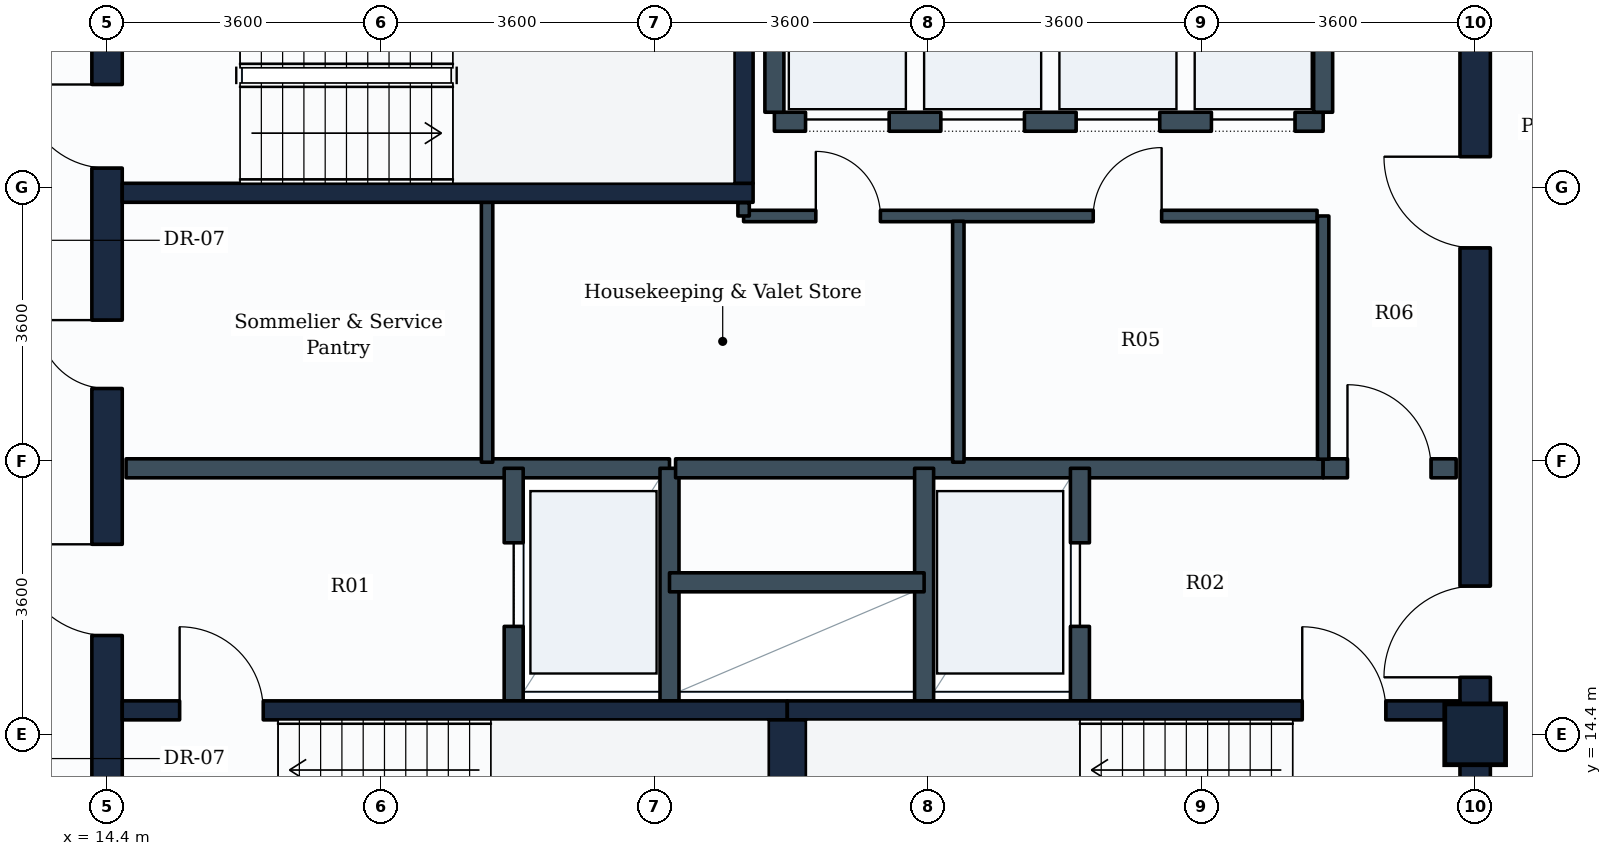
"""IFC4 building model, lengths in metres.
Left out: names, types, materials, properties, quantities, classifications, styles, units other than length and angle.
Written with IfcOpenShell. Run it as: python <this file> out.ifc"""

import sys

from ifc_helpers import new_model, si_unit, direction, frame, frame_2d, origin, origin_2d, place, context, subcontext, project, spatial, rectangle, extrude, element, fill, save


model = new_model("IFC4")
c1 = context("Model", 3, precision=1e-05, world=origin(), true_north=direction((0.0, 1.0)))
c2 = subcontext(c1, "Body", "Model", "MODEL_VIEW")
j1 = project(units=[si_unit("LENGTHUNIT", "METRE"), si_unit("PLANEANGLEUNIT", "RADIAN")], contexts=[c1])
p1 = place(None, origin())
s1 = spatial("IfcSite", under=j1, at=p1, CompositionType="ELEMENT")
p2 = place(p1, origin())
s2 = spatial("IfcBuilding", under=s1, at=p2, CompositionType="ELEMENT")
p3 = place(p2, frame((0.0, 0.0, 273.8)))
s3 = spatial("IfcBuildingStorey", under=s2, at=p3, CompositionType="ELEMENT", Elevation=273.8)
p4 = place(p3, frame((32.4, 14.4, 0.0), z_axis=(0.0, 0.0, 1.0), x_axis=(1.0, 0.0, 0.0)))
e1 = element("IfcColumn", 1, at=p4, inside=s3, PredefinedType="COLUMN", context=c2, shape_type="SweptSolid", body=[
    extrude(rectangle(XDim=0.8, YDim=0.8, at=origin_2d()), origin(), (0.0, 0.0, 1.0), 3.6),
])
p5 = place(p3, frame((14.4, 10.8, 0.0), z_axis=(0.0, 0.0, 1.0), x_axis=(0.0, 1.0, 0.0)))
e2 = element("IfcWall", 2, at=p5, inside=s3, PredefinedType="SHEAR", context=c2, shape_type="SweptSolid", body=[
    extrude(rectangle(XDim=14.4, YDim=0.4, at=frame_2d((7.2, 0.0))), origin(), (0.0, 0.0, 1.0), 3.35),
])
p6 = place(p5, frame((11.05, 0.0, 0.0)))
e3 = element("IfcOpeningElement", 3, at=p6, cuts=e2, PredefinedType="OPENING", context=c2, shape_type="SweptSolid", body=[
    extrude(rectangle(XDim=1.1, YDim=2.1, at=frame_2d((0.55, 1.05))), frame((0.0, 0.21, 0.0), z_axis=(0.0, -1.0, 0.0), x_axis=(1.0, 0.0, 0.0)), (0.0, 0.0, 1.0), 0.42),
])
p7 = place(p5, frame((4.9, 0.0, 0.0)))
e4 = element("IfcOpeningElement", 4, at=p7, cuts=e2, PredefinedType="OPENING", context=c2, shape_type="SweptSolid", body=[
    extrude(rectangle(XDim=1.2, YDim=2.1, at=frame_2d((0.6, 1.05))), frame((0.0, 0.21, 0.0), z_axis=(0.0, -1.0, 0.0), x_axis=(1.0, 0.0, 0.0)), (0.0, 0.0, 1.0), 0.42),
])
p8 = place(p5, frame((8.15, 0.0, 0.0)))
e5 = element("IfcOpeningElement", 5, at=p8, cuts=e2, PredefinedType="OPENING", context=c2, shape_type="SweptSolid", body=[
    extrude(rectangle(XDim=0.9, YDim=2.1, at=frame_2d((0.45, 1.05))), frame((0.0, 0.21, 0.0), z_axis=(0.0, -1.0, 0.0), x_axis=(1.0, 0.0, 0.0)), (0.0, 0.0, 1.0), 0.42),
])
p9 = place(p3, frame((32.4, 10.8, 0.0), z_axis=(0.0, 0.0, 1.0), x_axis=(0.0, 1.0, 0.0)))
e6 = element("IfcWall", 6, at=p9, inside=s3, PredefinedType="SHEAR", context=c2, shape_type="SweptSolid", body=[
    extrude(rectangle(XDim=14.4, YDim=0.4, at=frame_2d((7.2, 0.0))), origin(), (0.0, 0.0, 1.0), 3.35),
])
p10 = place(p9, frame((4.35, 0.0, 0.0)))
e7 = element("IfcOpeningElement", 7, at=p10, cuts=e6, PredefinedType="OPENING", context=c2, shape_type="SweptSolid", body=[
    extrude(rectangle(XDim=1.2, YDim=2.1, at=frame_2d((0.6, 1.05))), frame((0.0, 0.21, 0.0), z_axis=(0.0, -1.0, 0.0), x_axis=(1.0, 0.0, 0.0)), (0.0, 0.0, 1.0), 0.42),
])
p11 = place(p9, frame((10.0, 0.0, 0.0)))
e8 = element("IfcOpeningElement", 8, at=p11, cuts=e6, PredefinedType="OPENING", context=c2, shape_type="SweptSolid", body=[
    extrude(rectangle(XDim=1.2, YDim=2.1, at=frame_2d((0.6, 1.05))), frame((0.0, 0.21, 0.0), z_axis=(0.0, -1.0, 0.0), x_axis=(1.0, 0.0, 0.0)), (0.0, 0.0, 1.0), 0.42),
])
p12 = place(p3, frame((14.6, 14.715, 0.0), z_axis=(0.0, 0.0, 1.0), x_axis=(1.0, 0.0, 0.0)))
e9 = element("IfcWall", 9, at=p12, inside=s3, PredefinedType="SHEAR", context=c2, shape_type="SweptSolid", body=[
    extrude(rectangle(XDim=8.75, YDim=0.25, at=frame_2d((4.375, 0.0))), origin(), (0.0, 0.0, 1.0), 3.35),
])
p13 = place(p12, frame((0.755, 0.0, 0.0)))
e10 = element("IfcOpeningElement", 10, at=p13, cuts=e9, PredefinedType="OPENING", context=c2, shape_type="SweptSolid", body=[
    extrude(rectangle(XDim=1.1, YDim=2.1, at=frame_2d((0.55, 1.05))), frame((0.0, 0.135, 0.0), z_axis=(0.0, -1.0, 0.0), x_axis=(1.0, 0.0, 0.0)), (0.0, 0.0, 1.0), 0.27),
])
p14 = place(p3, frame((23.35, 14.715, 0.0), z_axis=(0.0, 0.0, 1.0), x_axis=(1.0, 0.0, 0.0)))
e11 = element("IfcWall", 11, at=p14, inside=s3, PredefinedType="SHEAR", context=c2, shape_type="SweptSolid", body=[
    extrude(rectangle(XDim=8.85, YDim=0.25, at=frame_2d((4.425, 0.0))), origin(), (0.0, 0.0, 1.0), 3.35),
])
p15 = place(p14, frame((6.775, 0.0, 0.0)))
e12 = element("IfcOpeningElement", 12, at=p15, cuts=e11, PredefinedType="OPENING", context=c2, shape_type="SweptSolid", body=[
    extrude(rectangle(XDim=1.1, YDim=2.1, at=frame_2d((0.55, 1.05))), frame((0.0, 0.135, 0.0), z_axis=(0.0, -1.0, 0.0), x_axis=(1.0, 0.0, 0.0)), (0.0, 0.0, 1.0), 0.27),
])
p16 = place(p3, frame((23.35, 11.75, 0.0), z_axis=(0.0, 0.0, 1.0), x_axis=(0.0, 1.0, 0.0)))
e13 = element("IfcWall", 13, at=p16, inside=s3, PredefinedType="SHEAR", context=c2, shape_type="SweptSolid", body=[
    extrude(rectangle(XDim=2.84, YDim=0.5, at=frame_2d((1.42, 0.0))), origin(), (0.0, 0.0, 1.0), 3.35),
])
p17 = place(p3, frame((14.6, 21.525, 0.0), z_axis=(0.0, 0.0, 1.0), x_axis=(1.0, 0.0, 0.0)))
e14 = element("IfcWall", 14, at=p17, inside=s3, PredefinedType="SHEAR", context=c2, shape_type="SweptSolid", body=[
    extrude(rectangle(XDim=8.3, YDim=0.25, at=frame_2d((4.15, 0.0))), origin(), (0.0, 0.0, 1.0), 3.35),
])
p18 = place(p3, frame((22.775, 21.65, 0.0), z_axis=(0.0, 0.0, 1.0), x_axis=(0.0, 1.0, 0.0)))
e15 = element("IfcWall", 15, at=p18, inside=s3, PredefinedType="SHEAR", context=c2, shape_type="SweptSolid", body=[
    extrude(rectangle(XDim=2.84, YDim=0.25, at=frame_2d((1.42, 0.0))), origin(), (0.0, 0.0, 1.0), 3.35),
])
p19 = place(p3, frame((14.65, 17.9, 0.0), z_axis=(0.0, 0.0, 1.0), x_axis=(1.0, 0.0, 0.0)))
e16 = element("IfcWall", 16, at=p19, inside=s3, PredefinedType="PARTITIONING", context=c2, shape_type="SweptSolid", body=[
    extrude(rectangle(XDim=7.15, YDim=0.25, at=frame_2d((3.575, 0.0))), origin(), (0.0, 0.0, 1.0), 3.335),
])
p20 = place(p3, frame((19.75, 14.84, 0.0), z_axis=(0.0, 0.0, 1.0), x_axis=(0.0, 1.0, 0.0)))
e17 = element("IfcWall", 17, at=p20, inside=s3, PredefinedType="PARTITIONING", context=c2, shape_type="SweptSolid", body=[
    extrude(rectangle(XDim=3.06, YDim=0.25, at=frame_2d((1.53, 0.0))), origin(), (0.0, 0.0, 1.0), 3.335),
])
p21 = place(p20, frame((0.98, 0.0, 0.0)))
e18 = element("IfcOpeningElement", 18, at=p21, cuts=e17, PredefinedType="OPENING", context=c2, shape_type="SweptSolid", body=[
    extrude(rectangle(XDim=1.1, YDim=2.1, at=frame_2d((0.55, 1.05))), frame((0.0, 0.135, 0.0), z_axis=(0.0, -1.0, 0.0), x_axis=(1.0, 0.0, 0.0)), (0.0, 0.0, 1.0), 0.27),
])
p22 = place(p3, frame((21.8, 14.84, 0.0), z_axis=(0.0, 0.0, 1.0), x_axis=(0.0, 1.0, 0.0)))
e19 = element("IfcWall", 19, at=p22, inside=s3, PredefinedType="PARTITIONING", context=c2, shape_type="SweptSolid", body=[
    extrude(rectangle(XDim=3.06, YDim=0.25, at=frame_2d((1.53, 0.0))), origin(), (0.0, 0.0, 1.0), 3.335),
])
p23 = place(p3, frame((21.88, 17.9, 0.0), z_axis=(0.0, 0.0, 1.0), x_axis=(1.0, 0.0, 0.0)))
e20 = element("IfcWall", 20, at=p23, inside=s3, PredefinedType="PARTITIONING", context=c2, shape_type="SweptSolid", body=[
    extrude(rectangle(XDim=8.52, YDim=0.25, at=frame_2d((4.26, 0.0))), origin(), (0.0, 0.0, 1.0), 3.335),
])
p24 = place(p3, frame((30.4, 17.9, 0.0), z_axis=(0.0, 0.0, 1.0), x_axis=(1.0, 0.0, 0.0)))
e21 = element("IfcWall", 21, at=p24, inside=s3, PredefinedType="PARTITIONING", context=c2, shape_type="SweptSolid", body=[
    extrude(rectangle(XDim=1.75, YDim=0.25, at=frame_2d((0.875, 0.0))), origin(), (0.0, 0.0, 1.0), 3.335),
])
p25 = place(p24, frame((0.32, 0.0, 0.0)))
e22 = element("IfcOpeningElement", 22, at=p25, cuts=e21, PredefinedType="OPENING", context=c2, shape_type="SweptSolid", body=[
    extrude(rectangle(XDim=1.1, YDim=2.1, at=frame_2d((0.55, 1.05))), frame((0.0, 0.135, 0.0), z_axis=(0.0, -1.0, 0.0), x_axis=(1.0, 0.0, 0.0)), (0.0, 0.0, 1.0), 0.27),
])
p26 = place(p3, frame((25.15, 14.84, 0.0), z_axis=(0.0, 0.0, 1.0), x_axis=(0.0, 1.0, 0.0)))
e23 = element("IfcWall", 23, at=p26, inside=s3, PredefinedType="PARTITIONING", context=c2, shape_type="SweptSolid", body=[
    extrude(rectangle(XDim=3.06, YDim=0.25, at=frame_2d((1.53, 0.0))), origin(), (0.0, 0.0, 1.0), 3.335),
])
p27 = place(p3, frame((27.2, 14.84, 0.0), z_axis=(0.0, 0.0, 1.0), x_axis=(0.0, 1.0, 0.0)))
e24 = element("IfcWall", 24, at=p27, inside=s3, PredefinedType="PARTITIONING", context=c2, shape_type="SweptSolid", body=[
    extrude(rectangle(XDim=3.06, YDim=0.25, at=frame_2d((1.53, 0.0))), origin(), (0.0, 0.0, 1.0), 3.335),
])
p28 = place(p27, frame((0.98, 0.0, 0.0)))
e25 = element("IfcOpeningElement", 25, at=p28, cuts=e24, PredefinedType="OPENING", context=c2, shape_type="SweptSolid", body=[
    extrude(rectangle(XDim=1.1, YDim=2.1, at=frame_2d((0.55, 1.05))), frame((0.0, 0.135, 0.0), z_axis=(0.0, -1.0, 0.0), x_axis=(1.0, 0.0, 0.0)), (0.0, 0.0, 1.0), 0.27),
])
p29 = place(p3, frame((21.8, 16.4, 0.0), z_axis=(0.0, 0.0, 1.0), x_axis=(1.0, 0.0, 0.0)))
e26 = element("IfcWall", 26, at=p29, inside=s3, PredefinedType="PARTITIONING", context=c2, shape_type="SweptSolid", body=[
    extrude(rectangle(XDim=3.35, YDim=0.25, at=frame_2d((1.675, 0.0))), origin(), (0.0, 0.0, 1.0), 3.335),
])
p30 = place(p3, frame((23.18, 22.46, 0.0), z_axis=(0.0, 0.0, 1.0), x_axis=(1.0, 0.0, 0.0)))
e27 = element("IfcWall", 27, at=p30, inside=s3, PredefinedType="PARTITIONING", context=c2, shape_type="SweptSolid", body=[
    extrude(rectangle(XDim=7.22, YDim=0.25, at=frame_2d((3.61, 0.0))), origin(), (0.0, 0.0, 1.0), 3.335),
])
p31 = place(p30, frame((0.41, 0.0, 0.0)))
e28 = element("IfcOpeningElement", 28, at=p31, cuts=e27, PredefinedType="OPENING", context=c2, shape_type="SweptSolid", body=[
    extrude(rectangle(XDim=1.1, YDim=2.1, at=frame_2d((0.55, 1.05))), frame((0.0, 0.135, 0.0), z_axis=(0.0, -1.0, 0.0), x_axis=(1.0, 0.0, 0.0)), (0.0, 0.0, 1.0), 0.27),
])
p32 = place(p30, frame((2.19, 0.0, 0.0)))
e29 = element("IfcOpeningElement", 29, at=p32, cuts=e27, PredefinedType="OPENING", context=c2, shape_type="SweptSolid", body=[
    extrude(rectangle(XDim=1.1, YDim=2.1, at=frame_2d((0.55, 1.05))), frame((0.0, 0.135, 0.0), z_axis=(0.0, -1.0, 0.0), x_axis=(1.0, 0.0, 0.0)), (0.0, 0.0, 1.0), 0.27),
])
p33 = place(p30, frame((3.97, 0.0, 0.0)))
e30 = element("IfcOpeningElement", 30, at=p33, cuts=e27, PredefinedType="OPENING", context=c2, shape_type="SweptSolid", body=[
    extrude(rectangle(XDim=1.1, YDim=2.1, at=frame_2d((0.55, 1.05))), frame((0.0, 0.135, 0.0), z_axis=(0.0, -1.0, 0.0), x_axis=(1.0, 0.0, 0.0)), (0.0, 0.0, 1.0), 0.27),
])
p34 = place(p30, frame((5.75, 0.0, 0.0)))
e31 = element("IfcOpeningElement", 31, at=p34, cuts=e27, PredefinedType="OPENING", context=c2, shape_type="SweptSolid", body=[
    extrude(rectangle(XDim=1.1, YDim=2.1, at=frame_2d((0.55, 1.05))), frame((0.0, 0.135, 0.0), z_axis=(0.0, -1.0, 0.0), x_axis=(1.0, 0.0, 0.0)), (0.0, 0.0, 1.0), 0.27),
])
for number, where, z_axis, x_axis in (
    (32, (23.18, 22.585, 0.0), (0.0, 0.0, 1.0), (0.0, 1.0, 0.0)),
    (33, (30.4, 22.585, 0.0), (0.0, 0.0, 1.0), (0.0, 1.0, 0.0)),
):
    element("IfcWall", number, at=place(p3, frame(where, z_axis=z_axis, x_axis=x_axis)), inside=s3, PredefinedType="PARTITIONING", context=c2, shape_type="SweptSolid", body=[
        extrude(rectangle(XDim=2.315, YDim=0.25, at=frame_2d((1.157, 0.0))), origin(), (0.0, 0.0, 1.0), 3.335),
    ])
p35 = place(p3, frame((22.775, 21.22, 0.0), z_axis=(0.0, 0.0, 1.0), x_axis=(1.0, 0.0, 0.0)))
e34 = element("IfcWall", 34, at=p35, inside=s3, PredefinedType="PARTITIONING", context=c2, shape_type="SweptSolid", body=[
    extrude(rectangle(XDim=7.545, YDim=0.15, at=frame_2d((3.772, 0.0))), origin(), (0.0, 0.0, 1.0), 3.335),
])
p36 = place(p35, frame((0.95, 0.0, 0.0)))
e35 = element("IfcOpeningElement", 35, at=p36, cuts=e34, PredefinedType="OPENING", context=c2, shape_type="SweptSolid", body=[
    extrude(rectangle(XDim=0.85, YDim=2.1, at=frame_2d((0.425, 1.05))), frame((0.0, 0.085, 0.0), z_axis=(0.0, -1.0, 0.0), x_axis=(1.0, 0.0, 0.0)), (0.0, 0.0, 1.0), 0.17),
])
p37 = place(p35, frame((4.6, 0.0, 0.0)))
e36 = element("IfcOpeningElement", 36, at=p37, cuts=e34, PredefinedType="OPENING", context=c2, shape_type="SweptSolid", body=[
    extrude(rectangle(XDim=0.9, YDim=2.1, at=frame_2d((0.45, 1.05))), frame((0.0, 0.085, 0.0), z_axis=(0.0, -1.0, 0.0), x_axis=(1.0, 0.0, 0.0)), (0.0, 0.0, 1.0), 0.17),
])
p38 = place(p3, frame((22.775, 21.22, 0.0), z_axis=(0.0, 0.0, 1.0), x_axis=(0.0, 1.0, 0.0)))
e37 = element("IfcWall", 37, at=p38, inside=s3, PredefinedType="PARTITIONING", context=c2, shape_type="SweptSolid", body=[
    extrude(rectangle(XDim=0.175, YDim=0.15, at=frame_2d((0.087, 0.0))), origin(), (0.0, 0.0, 1.0), 3.335),
])
p39 = place(p3, frame((30.4, 18.02, 0.0), z_axis=(0.0, 0.0, 1.0), x_axis=(0.0, 1.0, 0.0)))
e38 = element("IfcWall", 38, at=p39, inside=s3, PredefinedType="PARTITIONING", context=c2, shape_type="SweptSolid", body=[
    extrude(rectangle(XDim=3.2, YDim=0.15, at=frame_2d((1.6, 0.0))), origin(), (0.0, 0.0, 1.0), 3.335),
])
p40 = place(p3, frame((19.4, 17.98, 0.0), z_axis=(0.0, 0.0, 1.0), x_axis=(0.0, 1.0, 0.0)))
e39 = element("IfcWall", 39, at=p40, inside=s3, PredefinedType="PARTITIONING", context=c2, shape_type="SweptSolid", body=[
    extrude(rectangle(XDim=3.42, YDim=0.15, at=frame_2d((1.71, 0.0))), origin(), (0.0, 0.0, 1.0), 3.335),
])
p41 = place(p3, frame((25.6, 17.98, 0.0), z_axis=(0.0, 0.0, 1.0), x_axis=(0.0, 1.0, 0.0)))
e40 = element("IfcWall", 40, at=p41, inside=s3, PredefinedType="PARTITIONING", context=c2, shape_type="SweptSolid", body=[
    extrude(rectangle(XDim=3.17, YDim=0.15, at=frame_2d((1.585, 0.0))), origin(), (0.0, 0.0, 1.0), 3.335),
])
p42 = place(p13, origin())
e41 = element("IfcDoor", 41, at=p42, inside=s3, OperationType="SINGLE_SWING_LEFT", PredefinedType="DOOR", context=c2, shape_type="SweptSolid", body=[
    extrude(rectangle(XDim=1.1, YDim=2.1, at=frame_2d((0.55, 1.05))), frame((0.0, 0.025, 0.0), z_axis=(0.0, -1.0, 0.0), x_axis=(1.0, 0.0, 0.0)), (0.0, 0.0, 1.0), 0.05),
])
fill(e10, e41)
p43 = place(p15, origin())
e42 = element("IfcDoor", 42, at=p43, inside=s3, OperationType="SINGLE_SWING_LEFT", PredefinedType="DOOR", context=c2, shape_type="SweptSolid", body=[
    extrude(rectangle(XDim=1.1, YDim=2.1, at=frame_2d((0.55, 1.05))), frame((0.0, 0.025, 0.0), z_axis=(0.0, -1.0, 0.0), x_axis=(1.0, 0.0, 0.0)), (0.0, 0.0, 1.0), 0.05),
])
fill(e12, e42)
p44 = place(p6, origin())
e43 = element("IfcDoor", 43, at=p44, inside=s3, OperationType="SINGLE_SWING_RIGHT", PredefinedType="DOOR", context=c2, shape_type="SweptSolid", body=[
    extrude(rectangle(XDim=1.1, YDim=2.1, at=frame_2d((0.55, 1.05))), frame((0.0, 0.025, 0.0), z_axis=(0.0, -1.0, 0.0), x_axis=(1.0, 0.0, 0.0)), (0.0, 0.0, 1.0), 0.05),
])
fill(e3, e43)
p45 = place(p21, origin())
e44 = element("IfcDoor", 44, at=p45, inside=s3, OperationType="SLIDING_TO_LEFT", PredefinedType="DOOR", context=c2, shape_type="SweptSolid", body=[
    extrude(rectangle(XDim=1.1, YDim=2.1, at=frame_2d((0.55, 1.05))), frame((0.0, 0.025, 0.0), z_axis=(0.0, -1.0, 0.0), x_axis=(1.0, 0.0, 0.0)), (0.0, 0.0, 1.0), 0.05),
])
fill(e18, e44)
p46 = place(p28, origin())
e45 = element("IfcDoor", 45, at=p46, inside=s3, OperationType="SLIDING_TO_LEFT", PredefinedType="DOOR", context=c2, shape_type="SweptSolid", body=[
    extrude(rectangle(XDim=1.1, YDim=2.1, at=frame_2d((0.55, 1.05))), frame((0.0, 0.025, 0.0), z_axis=(0.0, -1.0, 0.0), x_axis=(1.0, 0.0, 0.0)), (0.0, 0.0, 1.0), 0.05),
])
fill(e25, e45)
p47 = place(p7, origin())
e46 = element("IfcDoor", 46, at=p47, inside=s3, OperationType="SINGLE_SWING_RIGHT", PredefinedType="DOOR", context=c2, shape_type="SweptSolid", body=[
    extrude(rectangle(XDim=1.2, YDim=2.1, at=frame_2d((0.6, 1.05))), frame((0.0, 0.025, 0.0), z_axis=(0.0, -1.0, 0.0), x_axis=(1.0, 0.0, 0.0)), (0.0, 0.0, 1.0), 0.05),
])
fill(e4, e46)
p48 = place(p10, origin())
e47 = element("IfcDoor", 47, at=p48, inside=s3, OperationType="SINGLE_SWING_LEFT", PredefinedType="DOOR", context=c2, shape_type="SweptSolid", body=[
    extrude(rectangle(XDim=1.2, YDim=2.1, at=frame_2d((0.6, 1.05))), frame((0.0, 0.025, 0.0), z_axis=(0.0, -1.0, 0.0), x_axis=(1.0, 0.0, 0.0)), (0.0, 0.0, 1.0), 0.05),
])
fill(e7, e47)
p49 = place(p25, origin())
e48 = element("IfcDoor", 48, at=p49, inside=s3, OperationType="SINGLE_SWING_LEFT", PredefinedType="DOOR", context=c2, shape_type="SweptSolid", body=[
    extrude(rectangle(XDim=1.1, YDim=2.1, at=frame_2d((0.55, 1.05))), frame((0.0, 0.025, 0.0), z_axis=(0.0, -1.0, 0.0), x_axis=(1.0, 0.0, 0.0)), (0.0, 0.0, 1.0), 0.05),
])
fill(e22, e48)
p50 = place(p31, origin())
e49 = element("IfcDoor", 49, at=p50, inside=s3, OperationType="SLIDING_TO_LEFT", PredefinedType="DOOR", context=c2, shape_type="SweptSolid", body=[
    extrude(rectangle(XDim=1.1, YDim=2.1, at=frame_2d((0.55, 1.05))), frame((0.0, 0.025, 0.0), z_axis=(0.0, -1.0, 0.0), x_axis=(1.0, 0.0, 0.0)), (0.0, 0.0, 1.0), 0.05),
])
fill(e28, e49)
p51 = place(p32, origin())
e50 = element("IfcDoor", 50, at=p51, inside=s3, OperationType="SLIDING_TO_LEFT", PredefinedType="DOOR", context=c2, shape_type="SweptSolid", body=[
    extrude(rectangle(XDim=1.1, YDim=2.1, at=frame_2d((0.55, 1.05))), frame((0.0, 0.025, 0.0), z_axis=(0.0, -1.0, 0.0), x_axis=(1.0, 0.0, 0.0)), (0.0, 0.0, 1.0), 0.05),
])
fill(e29, e50)
p52 = place(p33, origin())
e51 = element("IfcDoor", 51, at=p52, inside=s3, OperationType="SLIDING_TO_LEFT", PredefinedType="DOOR", context=c2, shape_type="SweptSolid", body=[
    extrude(rectangle(XDim=1.1, YDim=2.1, at=frame_2d((0.55, 1.05))), frame((0.0, 0.025, 0.0), z_axis=(0.0, -1.0, 0.0), x_axis=(1.0, 0.0, 0.0)), (0.0, 0.0, 1.0), 0.05),
])
fill(e30, e51)
p53 = place(p34, origin())
e52 = element("IfcDoor", 52, at=p53, inside=s3, OperationType="SLIDING_TO_LEFT", PredefinedType="DOOR", context=c2, shape_type="SweptSolid", body=[
    extrude(rectangle(XDim=1.1, YDim=2.1, at=frame_2d((0.55, 1.05))), frame((0.0, 0.025, 0.0), z_axis=(0.0, -1.0, 0.0), x_axis=(1.0, 0.0, 0.0)), (0.0, 0.0, 1.0), 0.05),
])
fill(e31, e52)
p54 = place(p11, origin())
e53 = element("IfcDoor", 53, at=p54, inside=s3, OperationType="SINGLE_SWING_RIGHT", PredefinedType="DOOR", context=c2, shape_type="SweptSolid", body=[
    extrude(rectangle(XDim=1.2, YDim=2.1, at=frame_2d((0.6, 1.05))), frame((0.0, 0.025, 0.0), z_axis=(0.0, -1.0, 0.0), x_axis=(1.0, 0.0, 0.0)), (0.0, 0.0, 1.0), 0.05),
])
fill(e8, e53)
p55 = place(p8, origin())
e54 = element("IfcDoor", 54, at=p55, inside=s3, OperationType="SINGLE_SWING_RIGHT", PredefinedType="DOOR", context=c2, shape_type="SweptSolid", body=[
    extrude(rectangle(XDim=0.9, YDim=2.1, at=frame_2d((0.45, 1.05))), frame((0.0, 0.025, 0.0), z_axis=(0.0, -1.0, 0.0), x_axis=(1.0, 0.0, 0.0)), (0.0, 0.0, 1.0), 0.05),
])
fill(e5, e54)
p56 = place(p36, origin())
e55 = element("IfcDoor", 55, at=p56, inside=s3, OperationType="SINGLE_SWING_LEFT", PredefinedType="DOOR", context=c2, shape_type="SweptSolid", body=[
    extrude(rectangle(XDim=0.85, YDim=2.1, at=frame_2d((0.425, 1.05))), frame((0.0, 0.025, 0.0), z_axis=(0.0, -1.0, 0.0), x_axis=(1.0, 0.0, 0.0)), (0.0, 0.0, 1.0), 0.05),
])
fill(e35, e55)
p57 = place(p37, origin())
e56 = element("IfcDoor", 56, at=p57, inside=s3, OperationType="SINGLE_SWING_RIGHT", PredefinedType="DOOR", context=c2, shape_type="SweptSolid", body=[
    extrude(rectangle(XDim=0.9, YDim=2.1, at=frame_2d((0.45, 1.05))), frame((0.0, 0.025, 0.0), z_axis=(0.0, -1.0, 0.0), x_axis=(1.0, 0.0, 0.0)), (0.0, 0.0, 1.0), 0.05),
])
fill(e36, e56)
save(model, sys.argv[1])
